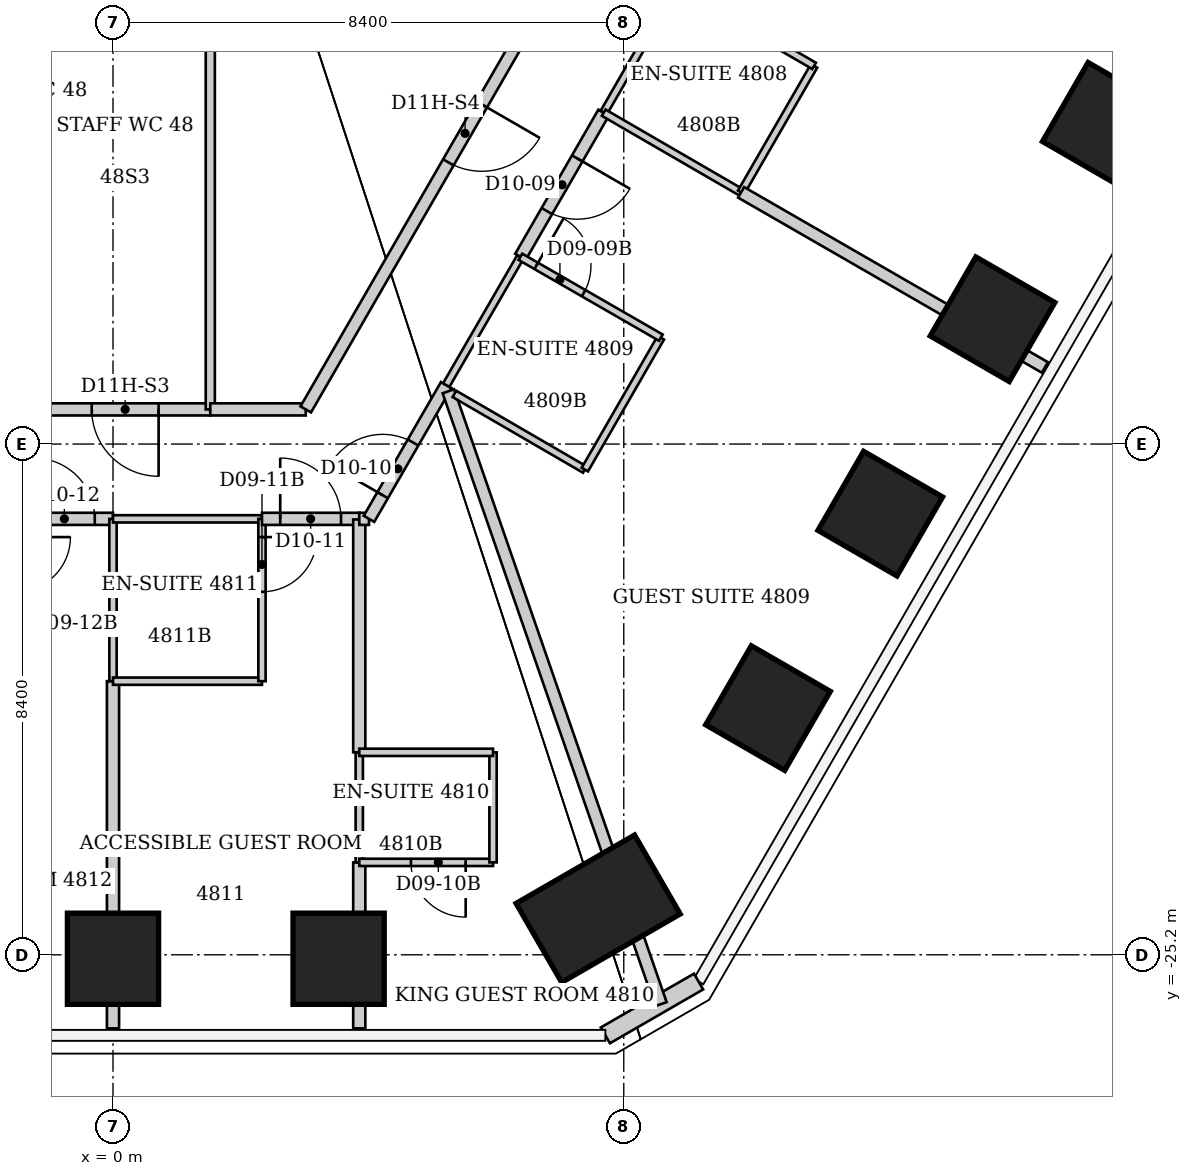
"""IFC4 building model, lengths in metres.
Left out: names, types, materials, properties, quantities, classifications, styles, units other than length and angle.
Written with IfcOpenShell. Run it as: python <this file> out.ifc"""

import sys

from ifc_helpers import new_model, si_unit, direction, frame, frame_2d, origin, origin_2d, place, context, subcontext, project, spatial, rectangle, extrude, element, fill, save


model = new_model("IFC4")
c1 = context("Model", 3, precision=1e-05, world=origin(), true_north=direction((0.0, 1.0)))
c2 = subcontext(c1, "Body", "Model", "MODEL_VIEW")
j1 = project(units=[si_unit("LENGTHUNIT", "METRE"), si_unit("PLANEANGLEUNIT", "RADIAN")], contexts=[c1])
p1 = place(None, origin())
s1 = spatial("IfcSite", under=j1, at=p1, CompositionType="ELEMENT")
p2 = place(p1, origin())
s2 = spatial("IfcBuilding", under=s1, at=p2, CompositionType="ELEMENT")
p3 = place(p2, frame((0.0, 0.0, 194.6)))
s3 = spatial("IfcBuildingStorey", under=s2, at=p3, CompositionType="ELEMENT", Elevation=194.6)
for number, where, z_axis, x_axis in (
    (1, (16.311, -11.549, 0.0), (0.0, 0.0, 1.0), (0.866, -0.5, 0.0)),
    (2, (14.465, -14.747, 0.0), (0.0, 0.0, 1.0), (0.866, -0.5, 0.0)),
    (3, (12.618, -17.945, 0.0), (0.0, 0.0, 1.0), (0.866, -0.5, 0.0)),
    (4, (10.772, -21.142, 0.0), (0.0, 0.0, 1.0), (0.866, -0.5, 0.0)),
):
    element("IfcColumn", number, at=place(p3, frame(where, z_axis=z_axis, x_axis=x_axis)), inside=s3, PredefinedType="COLUMN", context=c2, shape_type="SweptSolid", body=[
        extrude(rectangle(XDim=1.5, YDim=1.5, at=origin_2d()), origin(), (0.0, 0.0, 1.0), 3.8),
    ])
p4 = place(p3, frame((7.979, -24.442, 0.0), z_axis=(0.0, 0.0, 1.0), x_axis=(0.5, -0.866025403784, 0.0)))
e5 = element("IfcColumn", 5, at=p4, inside=s3, PredefinedType="COLUMN", context=c2, shape_type="SweptSolid", body=[
    extrude(rectangle(XDim=1.5, YDim=2.25, at=origin_2d()), origin(), (0.0, 0.0, 1.0), 3.8),
])
for number, where, z_axis, x_axis in (
    (6, (3.71, -25.265, 0.0), (0.0, 0.0, 1.0), (0.0, -1.0, 0.0)),
    (7, (0.0, -25.265, 0.0), (0.0, 0.0, 1.0), (0.0, -1.0, 0.0)),
):
    element("IfcColumn", number, at=place(p3, frame(where, z_axis=z_axis, x_axis=x_axis)), inside=s3, PredefinedType="COLUMN", context=c2, shape_type="SweptSolid", body=[
        extrude(rectangle(XDim=1.5, YDim=1.5, at=origin_2d()), origin(), (0.0, 0.0, 1.0), 3.8),
    ])
p5 = place(p3, frame((9.63, -25.64, 0.0), z_axis=(0.0, 0.0, 1.0), x_axis=(-0.866036293601, -0.499981137809, 0.0)))
e8 = element("IfcWall", 8, at=p5, inside=s3, PredefinedType="SOLIDWALL", context=c2, shape_type="SweptSolid", body=[
    extrude(rectangle(XDim=1.77, YDim=0.3, at=frame_2d((0.885, 0.0))), origin(), (0.0, 0.0, 1.0), 3.64),
])
p6 = place(p3, frame((-1.6, -18.03, 0.0), z_axis=(0.0, 0.0, 1.0), x_axis=(1.0, 0.0, 0.0)))
e9 = element("IfcWall", 9, at=p6, inside=s3, PredefinedType="PARTITIONING", context=c2, shape_type="SweptSolid", body=[
    extrude(rectangle(XDim=1.6, YDim=0.2, at=frame_2d((0.8, 0.0))), origin(), (0.0, 0.0, 1.0), 3.64),
])
p7 = place(p6, frame((0.3, 0.0, 0.0)))
e10 = element("IfcOpeningElement", 10, at=p7, cuts=e9, PredefinedType="OPENING", context=c2, shape_type="SweptSolid", body=[
    extrude(rectangle(XDim=1.0, YDim=2.13, at=frame_2d((0.5, 1.065))), frame((0.0, 0.1, 0.0), z_axis=(0.0, -1.0, 0.0), x_axis=(1.0, 0.0, 0.0)), (0.0, 0.0, 1.0), 0.2),
])
p8 = place(p3, frame((0.0, -26.41, 0.0), z_axis=(0.0, 0.0, 1.0), x_axis=(0.0, 1.0, 0.0)))
e11 = element("IfcWall", 11, at=p8, inside=s3, PredefinedType="PARTITIONING", context=c2, shape_type="SweptSolid", body=[
    extrude(rectangle(XDim=5.71, YDim=0.2, at=frame_2d((2.855, 0.0))), origin(), (0.0, 0.0, 1.0), 2.726),
])
p9 = place(p3, frame((0.0, -20.7, 0.0), z_axis=(0.0, 0.0, 1.0), x_axis=(0.0, 1.0, 0.0)))
e12 = element("IfcWall", 12, at=p9, inside=s3, PredefinedType="PARTITIONING", context=c2, shape_type="SweptSolid", body=[
    extrude(rectangle(XDim=2.67, YDim=0.12, at=frame_2d((1.335, 0.0))), origin(), (0.0, 0.0, 1.0), 2.726),
])
for number, where, z_axis, x_axis in (
    (13, (0.0, -20.7, 0.0), (0.0, 0.0, 1.0), (1.0, 0.0, 0.0)),
    (14, (0.0, -18.03, 0.0), (0.0, 0.0, 1.0), (1.0, 0.0, 0.0)),
):
    element("IfcWall", number, at=place(p3, frame(where, z_axis=z_axis, x_axis=x_axis)), inside=s3, PredefinedType="PARTITIONING", context=c2, shape_type="SweptSolid", body=[
        extrude(rectangle(XDim=2.45, YDim=0.12, at=frame_2d((1.225, 0.0))), origin(), (0.0, 0.0, 1.0), 3.64),
    ])
p10 = place(p3, frame((1.6, -16.23, 0.0), z_axis=(0.0, 0.0, 1.0), x_axis=(-1.0, 0.0, 0.0)))
e15 = element("IfcWall", 15, at=p10, inside=s3, PredefinedType="PARTITIONING", context=c2, shape_type="SweptSolid", body=[
    extrude(rectangle(XDim=2.8, YDim=0.2, at=frame_2d((1.4, 0.0))), origin(), (0.0, 0.0, 1.0), 3.64),
])
p11 = place(p10, frame((0.85, 0.0, 0.0)))
e16 = element("IfcOpeningElement", 16, at=p11, cuts=e15, PredefinedType="OPENING", context=c2, shape_type="SweptSolid", body=[
    extrude(rectangle(XDim=1.1, YDim=2.2, at=frame_2d((0.55, 1.1))), frame((0.0, 0.1, 0.0), z_axis=(0.0, -1.0, 0.0), x_axis=(1.0, 0.0, 0.0)), (0.0, 0.0, 1.0), 0.2),
])
p12 = place(p3, frame((1.6, -7.1, 0.0), z_axis=(0.0, 0.0, 1.0), x_axis=(0.0, -1.0, 0.0)))
e17 = element("IfcWall", 17, at=p12, inside=s3, PredefinedType="PARTITIONING", context=c2, shape_type="SweptSolid", body=[
    extrude(rectangle(XDim=9.13, YDim=0.15, at=frame_2d((4.565, 0.0))), origin(), (0.0, 0.0, 1.0), 3.64),
])
p13 = place(p3, frame((2.45, -20.7, 0.0), z_axis=(0.0, 0.0, 1.0), x_axis=(0.0, 1.0, 0.0)))
e18 = element("IfcWall", 18, at=p13, inside=s3, PredefinedType="PARTITIONING", context=c2, shape_type="SweptSolid", body=[
    extrude(rectangle(XDim=2.67, YDim=0.12, at=frame_2d((1.335, 0.0))), origin(), (0.0, 0.0, 1.0), 3.64),
])
p14 = place(p13, frame((1.47, 0.0, 0.0)))
e19 = element("IfcOpeningElement", 19, at=p14, cuts=e18, PredefinedType="OPENING", context=c2, shape_type="SweptSolid", body=[
    extrude(rectangle(XDim=0.9, YDim=2.03, at=frame_2d((0.45, 1.015))), frame((0.0, 0.06, 0.0), z_axis=(0.0, -1.0, 0.0), x_axis=(1.0, 0.0, 0.0)), (0.0, 0.0, 1.0), 0.12),
])
p15 = place(p3, frame((2.45, -18.03, 0.0), z_axis=(0.0, 0.0, 1.0), x_axis=(1.0, 0.0, 0.0)))
e20 = element("IfcWall", 20, at=p15, inside=s3, PredefinedType="PARTITIONING", context=c2, shape_type="SweptSolid", body=[
    extrude(rectangle(XDim=1.6, YDim=0.2, at=frame_2d((0.8, 0.0))), origin(), (0.0, 0.0, 1.0), 3.64),
])
p16 = place(p15, frame((0.3, 0.0, 0.0)))
e21 = element("IfcOpeningElement", 21, at=p16, cuts=e20, PredefinedType="OPENING", context=c2, shape_type="SweptSolid", body=[
    extrude(rectangle(XDim=1.0, YDim=2.13, at=frame_2d((0.5, 1.065))), frame((0.0, 0.1, 0.0), z_axis=(0.0, -1.0, 0.0), x_axis=(1.0, 0.0, 0.0)), (0.0, 0.0, 1.0), 0.2),
])
p17 = place(p3, frame((3.17, -16.23, 0.0), z_axis=(0.0, 0.0, 1.0), x_axis=(-1.0, 0.0, 0.0)))
e22 = element("IfcWall", 22, at=p17, inside=s3, PredefinedType="PARTITIONING", context=c2, shape_type="SweptSolid", body=[
    extrude(rectangle(XDim=1.57, YDim=0.2, at=frame_2d((0.785, 0.0))), origin(), (0.0, 0.0, 1.0), 3.64),
])
p18 = place(p3, frame((4.05, -26.41, 0.0), z_axis=(0.0, 0.0, 1.0), x_axis=(0.0, 1.0, 0.0)))
e23 = element("IfcWall", 23, at=p18, inside=s3, PredefinedType="PARTITIONING", context=c2, shape_type="SweptSolid", body=[
    extrude(rectangle(XDim=2.73, YDim=0.2, at=frame_2d((1.365, 0.0))), origin(), (0.0, 0.0, 1.0), 3.64),
])
p19 = place(p3, frame((4.05, -23.68, 0.0), z_axis=(0.0, 0.0, 1.0), x_axis=(0.0, 1.0, 0.0)))
e24 = element("IfcWall", 24, at=p19, inside=s3, PredefinedType="PARTITIONING", context=c2, shape_type="SweptSolid", body=[
    extrude(rectangle(XDim=1.81, YDim=0.12, at=frame_2d((0.905, 0.0))), origin(), (0.0, 0.0, 1.0), 3.64),
])
p20 = place(p3, frame((4.05, -23.68, 0.0), z_axis=(0.0, 0.0, 1.0), x_axis=(1.0, 0.0, 0.0)))
e25 = element("IfcWall", 25, at=p20, inside=s3, PredefinedType="PARTITIONING", context=c2, shape_type="SweptSolid", body=[
    extrude(rectangle(XDim=2.2, YDim=0.12, at=frame_2d((1.1, 0.0))), origin(), (0.0, 0.0, 1.0), 3.64),
])
p21 = place(p20, frame((0.85, 0.0, 0.0)))
e26 = element("IfcOpeningElement", 26, at=p21, cuts=e25, PredefinedType="OPENING", context=c2, shape_type="SweptSolid", body=[
    extrude(rectangle(XDim=0.9, YDim=2.03, at=frame_2d((0.45, 1.015))), frame((0.0, 0.06, 0.0), z_axis=(0.0, -1.0, 0.0), x_axis=(1.0, 0.0, 0.0)), (0.0, 0.0, 1.0), 0.12),
])
p22 = place(p3, frame((4.05, -21.87, 0.0), z_axis=(0.0, 0.0, 1.0), x_axis=(0.0, 1.0, 0.0)))
e27 = element("IfcWall", 27, at=p22, inside=s3, PredefinedType="PARTITIONING", context=c2, shape_type="SweptSolid", body=[
    extrude(rectangle(XDim=3.83, YDim=0.2, at=frame_2d((1.915, 0.0))), origin(), (0.0, 0.0, 1.0), 3.64),
])
p23 = place(p3, frame((4.05, -18.03, 0.0), z_axis=(0.0, 0.0, 1.0), x_axis=(1.0, 0.0, 0.0)))
e28 = element("IfcWall", 28, at=p23, inside=s3, PredefinedType="PARTITIONING", context=c2, shape_type="SweptSolid", body=[
    extrude(rectangle(XDim=0.16, YDim=0.2, at=frame_2d((0.08, 0.0))), origin(), (0.0, 0.0, 1.0), 3.64),
])
p24 = place(p3, frame((4.21, -18.03, 0.0), z_axis=(0.0, 0.0, 1.0), x_axis=(0.499963722229, 0.866046347752, 0.0)))
e29 = element("IfcWall", 29, at=p24, inside=s3, PredefinedType="PARTITIONING", context=c2, shape_type="SweptSolid", body=[
    extrude(rectangle(XDim=2.54, YDim=0.2, at=frame_2d((1.27, 0.0))), origin(), (0.0, 0.0, 1.0), 3.64),
])
p25 = place(p24, frame((0.45, 0.0, 0.0)))
e30 = element("IfcOpeningElement", 30, at=p25, cuts=e29, PredefinedType="OPENING", context=c2, shape_type="SweptSolid", body=[
    extrude(rectangle(XDim=1.0, YDim=2.13, at=frame_2d((0.5, 1.065))), frame((0.0, 0.1, 0.0), z_axis=(0.0, -1.0, 0.0), x_axis=(1.0, 0.0, 0.0)), (0.0, 0.0, 1.0), 0.2),
])
p26 = place(p3, frame((5.48, -15.83, 0.0), z_axis=(0.0, 0.0, 1.0), x_axis=(0.501028373647, 0.865430857319, 0.0)))
e31 = element("IfcWall", 31, at=p26, inside=s3, PredefinedType="PARTITIONING", context=c2, shape_type="SweptSolid", body=[
    extrude(rectangle(XDim=2.437, YDim=0.12, at=frame_2d((1.219, 0.0))), origin(), (0.0, 0.0, 1.0), 3.64),
])
p27 = place(p3, frame((5.515, -15.932, 0.0), z_axis=(0.0, 0.0, 1.0), x_axis=(0.327594697431, -0.944818349851, 0.0)))
e32 = element("IfcWall", 32, at=p27, inside=s3, PredefinedType="PARTITIONING", context=c2, shape_type="SweptSolid", body=[
    extrude(rectangle(XDim=10.668, YDim=0.2, at=frame_2d((5.334, 0.0))), origin(), (0.0, 0.0, 1.0), 3.64),
])
p28 = place(p3, frame((5.615, -15.975, 0.0), z_axis=(0.0, 0.0, 1.0), x_axis=(0.864873056518, -0.501990633487, 0.0)))
e33 = element("IfcWall", 33, at=p28, inside=s3, PredefinedType="PARTITIONING", context=c2, shape_type="SweptSolid", body=[
    extrude(rectangle(XDim=2.48, YDim=0.12, at=frame_2d((1.24, 0.0))), origin(), (0.0, 0.0, 1.0), 3.038),
])
p29 = place(p3, frame((6.25, -23.68, 0.0), z_axis=(0.0, 0.0, 1.0), x_axis=(0.0, 1.0, 0.0)))
e34 = element("IfcWall", 34, at=p29, inside=s3, PredefinedType="PARTITIONING", context=c2, shape_type="SweptSolid", body=[
    extrude(rectangle(XDim=1.81, YDim=0.12, at=frame_2d((0.905, 0.0))), origin(), (0.0, 0.0, 1.0), 3.64),
])
p30 = place(p3, frame((6.25, -21.87, 0.0), z_axis=(0.0, 0.0, 1.0), x_axis=(-1.0, 0.0, 0.0)))
e35 = element("IfcWall", 35, at=p30, inside=s3, PredefinedType="PARTITIONING", context=c2, shape_type="SweptSolid", body=[
    extrude(rectangle(XDim=2.2, YDim=0.12, at=frame_2d((1.1, 0.0))), origin(), (0.0, 0.0, 1.0), 3.64),
])
p31 = place(p3, frame((7.76, -17.22, 0.0), z_axis=(0.0, 0.0, 1.0), x_axis=(0.499159685399, 0.866510016372, 0.0)))
e36 = element("IfcWall", 36, at=p31, inside=s3, PredefinedType="PARTITIONING", context=c2, shape_type="SweptSolid", body=[
    extrude(rectangle(XDim=2.504, YDim=0.12, at=frame_2d((1.252, 0.0))), origin(), (0.0, 0.0, 1.0), 3.64),
])
p32 = place(p3, frame((8.069, -11.349, 0.0), z_axis=(0.0, 0.0, 1.0), x_axis=(-0.499611785355, -0.866249423627, 0.0)))
e37 = element("IfcWall", 37, at=p32, inside=s3, PredefinedType="PARTITIONING", context=c2, shape_type="SweptSolid", body=[
    extrude(rectangle(XDim=2.738, YDim=0.2, at=frame_2d((1.369, 0.0))), origin(), (0.0, 0.0, 1.0), 3.64),
])
p33 = place(p32, frame((0.869, 0.0, 0.0)))
e38 = element("IfcOpeningElement", 38, at=p33, cuts=e37, PredefinedType="OPENING", context=c2, shape_type="SweptSolid", body=[
    extrude(rectangle(XDim=1.0, YDim=2.13, at=frame_2d((0.5, 1.065))), frame((0.0, 0.1, 0.0), z_axis=(0.0, -1.0, 0.0), x_axis=(1.0, 0.0, 0.0)), (0.0, 0.0, 1.0), 0.2),
])
p34 = place(p3, frame((8.07, -11.35, 0.0), z_axis=(0.0, 0.0, 1.0), x_axis=(0.499693115345, 0.866202511239, 0.0)))
e39 = element("IfcWall", 39, at=p34, inside=s3, PredefinedType="PARTITIONING", context=c2, shape_type="SweptSolid", body=[
    extrude(rectangle(XDim=2.401, YDim=0.12, at=frame_2d((1.201, 0.0))), origin(), (0.0, 0.0, 1.0), 3.64),
])
p35 = place(p3, frame((8.07, -11.35, 0.0), z_axis=(0.0, 0.0, 1.0), x_axis=(0.865195830568, -0.501434118073, 0.0)))
e40 = element("IfcWall", 40, at=p35, inside=s3, PredefinedType="PARTITIONING", context=c2, shape_type="SweptSolid", body=[
    extrude(rectangle(XDim=2.612, YDim=0.12, at=frame_2d((1.306, 0.0))), origin(), (0.0, 0.0, 1.0), 3.64),
])
p36 = place(p3, frame((8.41, -7.15, 0.0), z_axis=(0.0, 0.0, 1.0), x_axis=(-0.499828628176, -0.866124322748, 0.0)))
e41 = element("IfcWall", 41, at=p36, inside=s3, PredefinedType="PARTITIONING", context=c2, shape_type="SweptSolid", body=[
    extrude(rectangle(XDim=10.484, YDim=0.2, at=frame_2d((5.242, 0.0))), origin(), (0.0, 0.0, 1.0), 3.64),
])
p37 = place(p36, frame((4.692, 0.0, 0.0)))
e42 = element("IfcOpeningElement", 42, at=p37, cuts=e41, PredefinedType="OPENING", context=c2, shape_type="SweptSolid", body=[
    extrude(rectangle(XDim=1.1, YDim=2.2, at=frame_2d((0.55, 1.1))), frame((0.0, 0.1, 0.0), z_axis=(0.0, -1.0, 0.0), x_axis=(1.0, 0.0, 0.0)), (0.0, 0.0, 1.0), 0.2),
])
p38 = place(p3, frame((9.01, -15.05, 0.0), z_axis=(0.0, 0.0, 1.0), x_axis=(-0.866615255992, 0.498976951453, 0.0)))
e43 = element("IfcWall", 43, at=p38, inside=s3, PredefinedType="PARTITIONING", context=c2, shape_type="SweptSolid", body=[
    extrude(rectangle(XDim=2.666, YDim=0.12, at=frame_2d((1.333, 0.0))), origin(), (0.0, 0.0, 1.0), 3.64),
])
p39 = place(p38, frame((1.466, 0.0, 0.0)))
e44 = element("IfcOpeningElement", 44, at=p39, cuts=e43, PredefinedType="OPENING", context=c2, shape_type="SweptSolid", body=[
    extrude(rectangle(XDim=0.9, YDim=2.03, at=frame_2d((0.45, 1.015))), frame((0.0, 0.06, 0.0), z_axis=(0.0, -1.0, 0.0), x_axis=(1.0, 0.0, 0.0)), (0.0, 0.0, 1.0), 0.12),
])
p40 = place(p3, frame((10.33, -12.66, 0.0), z_axis=(0.0, 0.0, 1.0), x_axis=(0.499737123639, 0.866177122335, 0.0)))
e45 = element("IfcWall", 45, at=p40, inside=s3, PredefinedType="PARTITIONING", context=c2, shape_type="SweptSolid", body=[
    extrude(rectangle(XDim=2.401, YDim=0.12, at=frame_2d((1.201, 0.0))), origin(), (0.0, 0.0, 1.0), 3.64),
])
p41 = place(p3, frame((10.33, -12.66, 0.0), z_axis=(0.0, 0.0, 1.0), x_axis=(0.866342721203, -0.499449986905, 0.0)))
e46 = element("IfcWall", 46, at=p41, inside=s3, PredefinedType="PARTITIONING", context=c2, shape_type="SweptSolid", body=[
    extrude(rectangle(XDim=5.767, YDim=0.2, at=frame_2d((2.883, 0.0))), origin(), (0.0, 0.0, 1.0), 3.64),
])
p42 = place(p3, frame((11.53, -10.58, 0.0), z_axis=(0.0, 0.0, 1.0), x_axis=(-0.865155281359, 0.50150407689, 0.0)))
e47 = element("IfcWall", 47, at=p42, inside=s3, PredefinedType="PARTITIONING", context=c2, shape_type="SweptSolid", body=[
    extrude(rectangle(XDim=2.612, YDim=0.12, at=frame_2d((1.306, 0.0))), origin(), (0.0, 0.0, 1.0), 3.64),
])
p43 = place(p42, frame((1.412, 0.0, 0.0)))
e48 = element("IfcOpeningElement", 48, at=p43, cuts=e47, PredefinedType="OPENING", context=c2, shape_type="SweptSolid", body=[
    extrude(rectangle(XDim=0.9, YDim=2.03, at=frame_2d((0.45, 1.015))), frame((0.0, 0.06, 0.0), z_axis=(0.0, -1.0, 0.0), x_axis=(1.0, 0.0, 0.0)), (0.0, 0.0, 1.0), 0.12),
])
p44 = place(p33, origin())
e49 = element("IfcDoor", 49, at=p44, inside=s3, OperationType="SINGLE_SWING_LEFT", PredefinedType="DOOR", context=c2, shape_type="SweptSolid", body=[
    extrude(rectangle(XDim=1.0, YDim=2.13, at=frame_2d((0.5, 1.065))), frame((0.0, 0.025, 0.0), z_axis=(0.0, -1.0, 0.0), x_axis=(1.0, 0.0, 0.0)), (0.0, 0.0, 1.0), 0.05),
])
fill(e38, e49)
p45 = place(p39, origin())
e50 = element("IfcDoor", 50, at=p45, inside=s3, OperationType="SINGLE_SWING_RIGHT", PredefinedType="DOOR", context=c2, shape_type="SweptSolid", body=[
    extrude(rectangle(XDim=0.9, YDim=2.03, at=frame_2d((0.45, 1.015))), frame((0.0, 0.025, 0.0), z_axis=(0.0, -1.0, 0.0), x_axis=(1.0, 0.0, 0.0)), (0.0, 0.0, 1.0), 0.05),
])
fill(e44, e50)
p46 = place(p25, origin())
e51 = element("IfcDoor", 51, at=p46, inside=s3, OperationType="SINGLE_SWING_LEFT", PredefinedType="DOOR", context=c2, shape_type="SweptSolid", body=[
    extrude(rectangle(XDim=1.0, YDim=2.13, at=frame_2d((0.5, 1.065))), frame((0.0, 0.025, 0.0), z_axis=(0.0, -1.0, 0.0), x_axis=(1.0, 0.0, 0.0)), (0.0, 0.0, 1.0), 0.05),
])
fill(e30, e51)
p47 = place(p21, origin())
e52 = element("IfcDoor", 52, at=p47, inside=s3, OperationType="SINGLE_SWING_RIGHT", PredefinedType="DOOR", context=c2, shape_type="SweptSolid", body=[
    extrude(rectangle(XDim=0.9, YDim=2.03, at=frame_2d((0.45, 1.015))), frame((0.0, 0.025, 0.0), z_axis=(0.0, -1.0, 0.0), x_axis=(1.0, 0.0, 0.0)), (0.0, 0.0, 1.0), 0.05),
])
fill(e26, e52)
p48 = place(p16, origin())
e53 = element("IfcDoor", 53, at=p48, inside=s3, OperationType="SINGLE_SWING_LEFT", PredefinedType="DOOR", context=c2, shape_type="SweptSolid", body=[
    extrude(rectangle(XDim=1.0, YDim=2.13, at=frame_2d((0.5, 1.065))), frame((0.0, 0.025, 0.0), z_axis=(0.0, -1.0, 0.0), x_axis=(1.0, 0.0, 0.0)), (0.0, 0.0, 1.0), 0.05),
])
fill(e21, e53)
p49 = place(p14, origin())
e54 = element("IfcDoor", 54, at=p49, inside=s3, OperationType="SINGLE_SWING_RIGHT", PredefinedType="DOOR", context=c2, shape_type="SweptSolid", body=[
    extrude(rectangle(XDim=0.9, YDim=2.03, at=frame_2d((0.45, 1.015))), frame((0.0, 0.025, 0.0), z_axis=(0.0, -1.0, 0.0), x_axis=(1.0, 0.0, 0.0)), (0.0, 0.0, 1.0), 0.05),
])
fill(e19, e54)
p50 = place(p7, origin())
e55 = element("IfcDoor", 55, at=p50, inside=s3, OperationType="SINGLE_SWING_LEFT", PredefinedType="DOOR", context=c2, shape_type="SweptSolid", body=[
    extrude(rectangle(XDim=1.0, YDim=2.13, at=frame_2d((0.5, 1.065))), frame((0.0, 0.025, 0.0), z_axis=(0.0, -1.0, 0.0), x_axis=(1.0, 0.0, 0.0)), (0.0, 0.0, 1.0), 0.05),
])
fill(e10, e55)
p51 = place(p11, origin())
e56 = element("IfcDoor", 56, at=p51, inside=s3, OperationType="SINGLE_SWING_LEFT", PredefinedType="DOOR", context=c2, shape_type="SweptSolid", body=[
    extrude(rectangle(XDim=1.1, YDim=2.2, at=frame_2d((0.55, 1.1))), frame((0.0, 0.025, 0.0), z_axis=(0.0, -1.0, 0.0), x_axis=(1.0, 0.0, 0.0)), (0.0, 0.0, 1.0), 0.05),
])
fill(e16, e56)
p52 = place(p37, origin())
e57 = element("IfcDoor", 57, at=p52, inside=s3, OperationType="SINGLE_SWING_LEFT", PredefinedType="DOOR", context=c2, shape_type="SweptSolid", body=[
    extrude(rectangle(XDim=1.1, YDim=2.2, at=frame_2d((0.55, 1.1))), frame((0.0, 0.025, 0.0), z_axis=(0.0, -1.0, 0.0), x_axis=(1.0, 0.0, 0.0)), (0.0, 0.0, 1.0), 0.05),
])
fill(e42, e57)
save(model, sys.argv[1])
